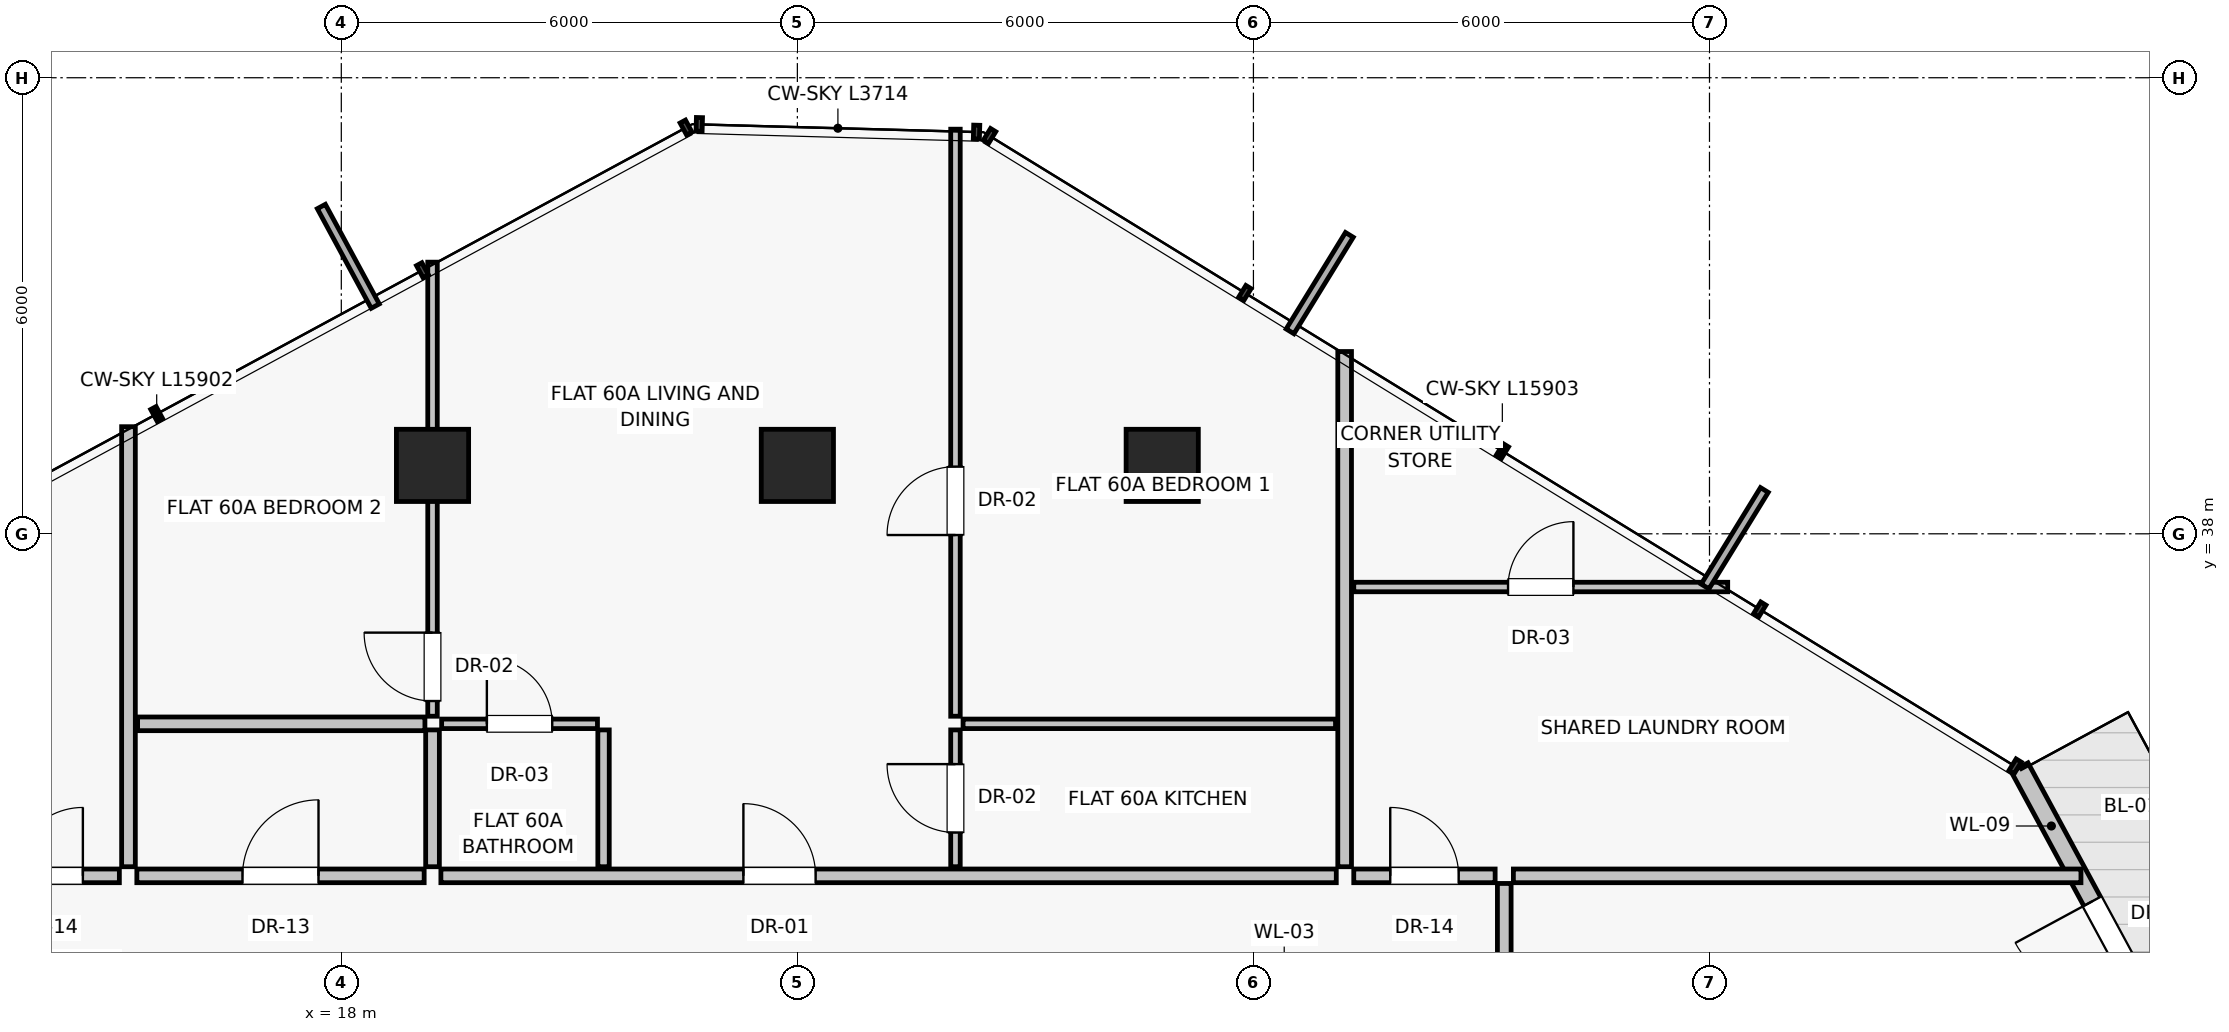
"""IFC4 building model, lengths in metres.
Left out: names, types, materials, properties, quantities, classifications, styles, units other than length and angle.
Written with IfcOpenShell. Run it as: python <this file> out.ifc"""

import sys

from ifc_helpers import new_model, si_unit, direction, frame, frame_2d, origin, origin_2d, place, context, subcontext, project, spatial, rectangle, extrude, source, transform, mapped, element, fill, save


model = new_model("IFC4")
c1 = context("Model", 3, precision=1e-05, world=origin(), true_north=direction((0.0, 1.0)))
c2 = subcontext(c1, "Body", "Model", "MODEL_VIEW")
j1 = project(units=[si_unit("LENGTHUNIT", "METRE"), si_unit("PLANEANGLEUNIT", "RADIAN")], contexts=[c1])
p1 = place(None, origin())
s1 = spatial("IfcSite", under=j1, at=p1, CompositionType="ELEMENT")
p2 = place(p1, origin())
s2 = spatial("IfcBuilding", under=s1, at=p2, CompositionType="ELEMENT")
p3 = place(p2, frame((0.0, 0.0, 211.35)))
s3 = spatial("IfcBuildingStorey", under=s2, at=p3, CompositionType="ELEMENT", Elevation=211.35)
for number, where, z_axis, x_axis in (
    (1, (28.8, 38.9, 0.0), (0.0, 0.0, 1.0), (1.0, 0.0, 0.0)),
    (2, (24.0, 38.9, 0.0), (0.0, 0.0, 1.0), (1.0, 0.0, 0.0)),
    (3, (19.2, 38.9, 0.0), (0.0, 0.0, 1.0), (1.0, 0.0, 0.0)),
):
    element("IfcColumn", number, at=place(p3, frame(where, z_axis=z_axis, x_axis=x_axis)), inside=s3, PredefinedType="COLUMN", context=c2, shape_type="SweptSolid", body=[
        extrude(rectangle(XDim=0.95, YDim=0.95, at=origin_2d()), origin(), (0.0, 0.0, 1.0), 4.3),
    ])
p4 = place(p3, frame((41.943, 31.485, 0.0), z_axis=(0.0, 0.0, 1.0), x_axis=(-0.475895309936, 0.879501935178, 0.0)))
e4 = element("IfcWall", 4, at=p4, inside=s3, PredefinedType="SOLIDWALL", context=c2, shape_type="SweptSolid", body=[
    extrude(rectangle(XDim=3.914, YDim=0.25, at=frame_2d((1.957, 0.0))), origin(), (0.0, 0.0, 1.0), 4.065),
])
p5 = place(p4, frame((0.76, 0.0, 0.0)))
e5 = element("IfcOpeningElement", 5, at=p5, cuts=e4, PredefinedType="OPENING", context=c2, shape_type="SweptSolid", body=[
    extrude(rectangle(XDim=1.15, YDim=2.25, at=frame_2d((0.575, 1.125))), frame((0.0, 0.135, 0.0), z_axis=(0.0, -1.0, 0.0), x_axis=(1.0, 0.0, 0.0)), (0.0, 0.0, 1.0), 0.27),
])
p6 = place(p3, frame((15.2, 33.62, 0.0), z_axis=(0.0, 0.0, 1.0), x_axis=(0.0, 1.0, 0.0)))
e6 = element("IfcWall", 6, at=p6, inside=s3, PredefinedType="PARTITIONING", context=c2, shape_type="SweptSolid", body=[
    extrude(rectangle(XDim=5.789, YDim=0.18, at=frame_2d((2.895, 0.0))), origin(), (0.0, 0.0, 1.0), 4.065),
])
p7 = place(p3, frame((31.2, 33.62, 0.0), z_axis=(0.0, 0.0, 1.0), x_axis=(0.0, 1.0, 0.0)))
e7 = element("IfcWall", 7, at=p7, inside=s3, PredefinedType="PARTITIONING", context=c2, shape_type="SweptSolid", body=[
    extrude(rectangle(XDim=6.778, YDim=0.18, at=frame_2d((3.389, 0.0))), origin(), (0.0, 0.0, 1.0), 4.065),
])
p8 = place(p3, frame((15.31, 33.5, 0.0), z_axis=(0.0, 0.0, 1.0), x_axis=(1.0, 0.0, 0.0)))
e8 = element("IfcWall", 8, at=p8, inside=s3, PredefinedType="PARTITIONING", context=c2, shape_type="SweptSolid", body=[
    extrude(rectangle(XDim=3.78, YDim=0.18, at=frame_2d((1.89, 0.0))), origin(), (0.0, 0.0, 1.0), 4.065),
])
p9 = place(p8, frame((1.39, 0.0, 0.0)))
e9 = element("IfcOpeningElement", 9, at=p9, cuts=e8, PredefinedType="OPENING", context=c2, shape_type="SweptSolid", body=[
    extrude(rectangle(XDim=1.0, YDim=2.01, at=frame_2d((0.5, 1.005))), frame((0.0, 0.1, 0.0), z_axis=(0.0, -1.0, 0.0), x_axis=(1.0, 0.0, 0.0)), (0.0, 0.0, 1.0), 0.2),
])
p10 = place(p3, frame((19.31, 33.5, 0.0), z_axis=(0.0, 0.0, 1.0), x_axis=(1.0, 0.0, 0.0)))
e10 = element("IfcWall", 10, at=p10, inside=s3, PredefinedType="PARTITIONING", context=c2, shape_type="SweptSolid", body=[
    extrude(rectangle(XDim=11.78, YDim=0.18, at=frame_2d((5.89, 0.0))), origin(), (0.0, 0.0, 1.0), 4.065),
])
p11 = place(p10, frame((3.98, 0.0, 0.0)))
e11 = element("IfcOpeningElement", 11, at=p11, cuts=e10, PredefinedType="OPENING", context=c2, shape_type="SweptSolid", body=[
    extrude(rectangle(XDim=0.95, YDim=2.02, at=frame_2d((0.475, 1.01))), frame((0.0, 0.1, 0.0), z_axis=(0.0, -1.0, 0.0), x_axis=(1.0, 0.0, 0.0)), (0.0, 0.0, 1.0), 0.2),
])
p12 = place(p3, frame((15.32, 35.5, 0.0), z_axis=(0.0, 0.0, 1.0), x_axis=(1.0, 0.0, 0.0)))
e12 = element("IfcWall", 12, at=p12, inside=s3, PredefinedType="PARTITIONING", context=c2, shape_type="SweptSolid", body=[
    extrude(rectangle(XDim=3.78, YDim=0.18, at=frame_2d((1.89, 0.0))), origin(), (0.0, 0.0, 1.0), 4.065),
])
p13 = place(p3, frame((19.2, 33.62, 0.0), z_axis=(0.0, 0.0, 1.0), x_axis=(0.0, 1.0, 0.0)))
e13 = element("IfcWall", 13, at=p13, inside=s3, PredefinedType="PARTITIONING", context=c2, shape_type="SweptSolid", body=[
    extrude(rectangle(XDim=1.8, YDim=0.18, at=frame_2d((0.9, 0.0))), origin(), (0.0, 0.0, 1.0), 4.065),
])
p14 = place(p3, frame((19.2, 35.6, 0.0), z_axis=(0.0, 0.0, 1.0), x_axis=(0.0, 1.0, 0.0)))
e14 = element("IfcWall", 14, at=p14, inside=s3, PredefinedType="PARTITIONING", context=c2, shape_type="SweptSolid", body=[
    extrude(rectangle(XDim=5.974, YDim=0.125, at=frame_2d((2.987, 0.0))), origin(), (0.0, 0.0, 1.0), 3.286),
])
p15 = place(p14, frame((0.2, 0.0, 0.0)))
e15 = element("IfcOpeningElement", 15, at=p15, cuts=e14, PredefinedType="OPENING", context=c2, shape_type="SweptSolid", body=[
    extrude(rectangle(XDim=0.9, YDim=2.01, at=frame_2d((0.45, 1.005))), frame((0.0, 0.073, 0.0), z_axis=(0.0, -1.0, 0.0), x_axis=(1.0, 0.0, 0.0)), (0.0, 0.0, 1.0), 0.145),
])
p16 = place(p3, frame((21.45, 33.62, 0.0), z_axis=(0.0, 0.0, 1.0), x_axis=(0.0, 1.0, 0.0)))
e16 = element("IfcWall", 16, at=p16, inside=s3, PredefinedType="PARTITIONING", context=c2, shape_type="SweptSolid", body=[
    extrude(rectangle(XDim=1.8, YDim=0.15, at=frame_2d((0.9, 0.0))), origin(), (0.0, 0.0, 1.0), 4.065),
])
p17 = place(p3, frame((19.32, 35.5, 0.0), z_axis=(0.0, 0.0, 1.0), x_axis=(1.0, 0.0, 0.0)))
e17 = element("IfcWall", 17, at=p17, inside=s3, PredefinedType="PARTITIONING", context=c2, shape_type="SweptSolid", body=[
    extrude(rectangle(XDim=2.05, YDim=0.125, at=frame_2d((1.025, 0.0))), origin(), (0.0, 0.0, 1.0), 3.712),
])
p18 = place(p17, frame((0.595, 0.0, 0.0)))
e18 = element("IfcOpeningElement", 18, at=p18, cuts=e17, PredefinedType="OPENING", context=c2, shape_type="SweptSolid", body=[
    extrude(rectangle(XDim=0.86, YDim=2.01, at=frame_2d((0.43, 1.005))), frame((0.0, 0.073, 0.0), z_axis=(0.0, -1.0, 0.0), x_axis=(1.0, 0.0, 0.0)), (0.0, 0.0, 1.0), 0.145),
])
p19 = place(p3, frame((26.08, 33.62, 0.0), z_axis=(0.0, 0.0, 1.0), x_axis=(0.0, 1.0, 0.0)))
e19 = element("IfcWall", 19, at=p19, inside=s3, PredefinedType="PARTITIONING", context=c2, shape_type="SweptSolid", body=[
    extrude(rectangle(XDim=1.8, YDim=0.125, at=frame_2d((0.9, 0.0))), origin(), (0.0, 0.0, 1.0), 4.065),
])
p20 = place(p19, frame((0.45, 0.0, 0.0)))
e20 = element("IfcOpeningElement", 20, at=p20, cuts=e19, PredefinedType="OPENING", context=c2, shape_type="SweptSolid", body=[
    extrude(rectangle(XDim=0.9, YDim=2.01, at=frame_2d((0.45, 1.005))), frame((0.0, 0.073, 0.0), z_axis=(0.0, -1.0, 0.0), x_axis=(1.0, 0.0, 0.0)), (0.0, 0.0, 1.0), 0.145),
])
p21 = place(p3, frame((26.18, 35.5, 0.0), z_axis=(0.0, 0.0, 1.0), x_axis=(1.0, 0.0, 0.0)))
e21 = element("IfcWall", 21, at=p21, inside=s3, PredefinedType="PARTITIONING", context=c2, shape_type="SweptSolid", body=[
    extrude(rectangle(XDim=4.9, YDim=0.125, at=frame_2d((2.45, 0.0))), origin(), (0.0, 0.0, 1.0), 3.712),
])
p22 = place(p3, frame((26.08, 35.6, 0.0), z_axis=(0.0, 0.0, 1.0), x_axis=(0.0, 1.0, 0.0)))
e22 = element("IfcWall", 22, at=p22, inside=s3, PredefinedType="PARTITIONING", context=c2, shape_type="SweptSolid", body=[
    extrude(rectangle(XDim=7.723, YDim=0.125, at=frame_2d((3.861, 0.0))), origin(), (0.0, 0.0, 1.0), 4.065),
])
p23 = place(p22, frame((2.384, 0.0, 0.0)))
e23 = element("IfcOpeningElement", 23, at=p23, cuts=e22, PredefinedType="OPENING", context=c2, shape_type="SweptSolid", body=[
    extrude(rectangle(XDim=0.9, YDim=2.01, at=frame_2d((0.45, 1.005))), frame((0.0, 0.073, 0.0), z_axis=(0.0, -1.0, 0.0), x_axis=(1.0, 0.0, 0.0)), (0.0, 0.0, 1.0), 0.145),
])
p24 = place(p3, frame((33.3, 31.5, 0.0), z_axis=(0.0, 0.0, 1.0), x_axis=(0.0, 1.0, 0.0)))
e24 = element("IfcWall", 24, at=p24, inside=s3, PredefinedType="PARTITIONING", context=c2, shape_type="SweptSolid", body=[
    extrude(rectangle(XDim=1.9, YDim=0.18, at=frame_2d((0.95, 0.0))), origin(), (0.0, 0.0, 1.0), 4.065),
])
p25 = place(p3, frame((13.22, 33.5, 0.0), z_axis=(0.0, 0.0, 1.0), x_axis=(1.0, 0.0, 0.0)))
e25 = element("IfcWall", 25, at=p25, inside=s3, PredefinedType="PARTITIONING", context=c2, shape_type="SweptSolid", body=[
    extrude(rectangle(XDim=1.86, YDim=0.18, at=frame_2d((0.93, 0.0))), origin(), (0.0, 0.0, 1.0), 4.065),
])
p26 = place(p25, frame((0.48, 0.0, 0.0)))
e26 = element("IfcOpeningElement", 26, at=p26, cuts=e25, PredefinedType="OPENING", context=c2, shape_type="SweptSolid", body=[
    extrude(rectangle(XDim=0.9, YDim=2.01, at=frame_2d((0.45, 1.005))), frame((0.0, 0.1, 0.0), z_axis=(0.0, -1.0, 0.0), x_axis=(1.0, 0.0, 0.0)), (0.0, 0.0, 1.0), 0.2),
])
p27 = place(p3, frame((33.42, 33.5, 0.0), z_axis=(0.0, 0.0, 1.0), x_axis=(1.0, 0.0, 0.0)))
e27 = element("IfcWall", 27, at=p27, inside=s3, PredefinedType="PARTITIONING", context=c2, shape_type="SweptSolid", body=[
    extrude(rectangle(XDim=7.467, YDim=0.18, at=frame_2d((3.733, 0.0))), origin(), (0.0, 0.0, 1.0), 4.065),
])
p28 = place(p3, frame((31.32, 33.5, 0.0), z_axis=(0.0, 0.0, 1.0), x_axis=(1.0, 0.0, 0.0)))
e28 = element("IfcWall", 28, at=p28, inside=s3, PredefinedType="PARTITIONING", context=c2, shape_type="SweptSolid", body=[
    extrude(rectangle(XDim=1.86, YDim=0.18, at=frame_2d((0.93, 0.0))), origin(), (0.0, 0.0, 1.0), 4.065),
])
p29 = place(p28, frame((0.48, 0.0, 0.0)))
e29 = element("IfcOpeningElement", 29, at=p29, cuts=e28, PredefinedType="OPENING", context=c2, shape_type="SweptSolid", body=[
    extrude(rectangle(XDim=0.9, YDim=2.01, at=frame_2d((0.45, 1.005))), frame((0.0, 0.1, 0.0), z_axis=(0.0, -1.0, 0.0), x_axis=(1.0, 0.0, 0.0)), (0.0, 0.0, 1.0), 0.2),
])
p30 = place(p3, frame((31.32, 37.3, 0.0), z_axis=(0.0, 0.0, 1.0), x_axis=(1.0, 0.0, 0.0)))
e30 = element("IfcWall", 30, at=p30, inside=s3, PredefinedType="PARTITIONING", context=c2, shape_type="SweptSolid", body=[
    extrude(rectangle(XDim=4.92, YDim=0.125, at=frame_2d((2.46, 0.0))), origin(), (0.0, 0.0, 1.0), 4.065),
])
p31 = place(p30, frame((2.03, 0.0, 0.0)))
e31 = element("IfcOpeningElement", 31, at=p31, cuts=e30, PredefinedType="OPENING", context=c2, shape_type="SweptSolid", body=[
    extrude(rectangle(XDim=0.86, YDim=2.01, at=frame_2d((0.43, 1.005))), frame((0.0, 0.073, 0.0), z_axis=(0.0, -1.0, 0.0), x_axis=(1.0, 0.0, 0.0)), (0.0, 0.0, 1.0), 0.145),
])
m1 = source(origin(), c2, "Body", "SweptSolid", [
    extrude(rectangle(XDim=1.15, YDim=2.25, at=frame_2d((0.575, 1.125))), frame((0.0, 0.025, 0.0), z_axis=(0.0, -1.0, 0.0), x_axis=(1.0, 0.0, 0.0)), (0.0, 0.0, 1.0), 0.05),
])
p32 = place(p5, frame((1.15, 0.0, 0.0), z_axis=(0.0, 0.0, 1.0), x_axis=(-1.0, 0.0, 0.0)))
e32 = element("IfcDoor", 32, at=p32, inside=s3, OperationType="SINGLE_SWING_RIGHT", PredefinedType="DOOR", context=c2, shape_type="MappedRepresentation", body=[
    mapped(m1, transform((0.0, 0.0, 0.0), scale=1.0)),
])
fill(e5, e32)
m2 = source(origin(), c2, "Body", "SweptSolid", [
    extrude(rectangle(XDim=1.0, YDim=2.01, at=frame_2d((0.5, 1.005))), frame((0.0, 0.025, 0.0), z_axis=(0.0, -1.0, 0.0), x_axis=(1.0, 0.0, 0.0)), (0.0, 0.0, 1.0), 0.05),
])
p33 = place(p9, origin())
e33 = element("IfcDoor", 33, at=p33, inside=s3, OperationType="SINGLE_SWING_RIGHT", PredefinedType="DOOR", context=c2, shape_type="MappedRepresentation", body=[
    mapped(m2, transform((0.0, 0.0, 0.0), scale=1.0)),
])
fill(e9, e33)
m3 = source(origin(), c2, "Body", "SweptSolid", [
    extrude(rectangle(XDim=0.95, YDim=2.02, at=frame_2d((0.475, 1.01))), frame((0.0, 0.025, 0.0), z_axis=(0.0, -1.0, 0.0), x_axis=(1.0, 0.0, 0.0)), (0.0, 0.0, 1.0), 0.05),
])
p34 = place(p11, origin())
e34 = element("IfcDoor", 34, at=p34, inside=s3, OperationType="SINGLE_SWING_LEFT", PredefinedType="DOOR", context=c2, shape_type="MappedRepresentation", body=[
    mapped(m3, transform((0.0, 0.0, 0.0), scale=1.0)),
])
fill(e11, e34)
m4 = source(origin(), c2, "Body", "SweptSolid", [
    extrude(rectangle(XDim=0.9, YDim=2.01, at=frame_2d((0.45, 1.005))), frame((0.0, 0.025, 0.0), z_axis=(0.0, -1.0, 0.0), x_axis=(1.0, 0.0, 0.0)), (0.0, 0.0, 1.0), 0.05),
])
p35 = place(p15, origin())
e35 = element("IfcDoor", 35, at=p35, inside=s3, OperationType="SINGLE_SWING_RIGHT", PredefinedType="DOOR", context=c2, shape_type="MappedRepresentation", body=[
    mapped(m4, transform((0.0, 0.0, 0.0), scale=1.0)),
])
fill(e15, e35)
m5 = source(origin(), c2, "Body", "SweptSolid", [
    extrude(rectangle(XDim=0.86, YDim=2.01, at=frame_2d((0.43, 1.005))), frame((0.0, 0.025, 0.0), z_axis=(0.0, -1.0, 0.0), x_axis=(1.0, 0.0, 0.0)), (0.0, 0.0, 1.0), 0.05),
])
p36 = place(p18, origin())
e36 = element("IfcDoor", 36, at=p36, inside=s3, OperationType="SINGLE_SWING_LEFT", PredefinedType="DOOR", context=c2, shape_type="MappedRepresentation", body=[
    mapped(m5, transform((0.0, 0.0, 0.0), scale=1.0)),
])
fill(e18, e36)
p37 = place(p20, origin())
e37 = element("IfcDoor", 37, at=p37, inside=s3, OperationType="SINGLE_SWING_RIGHT", PredefinedType="DOOR", context=c2, shape_type="MappedRepresentation", body=[
    mapped(m4, transform((0.0, 0.0, 0.0), scale=1.0)),
])
fill(e20, e37)
p38 = place(p23, origin())
e38 = element("IfcDoor", 38, at=p38, inside=s3, OperationType="SINGLE_SWING_LEFT", PredefinedType="DOOR", context=c2, shape_type="MappedRepresentation", body=[
    mapped(m4, transform((0.0, 0.0, 0.0), scale=1.0)),
])
fill(e23, e38)
p39 = place(p26, origin())
e39 = element("IfcDoor", 39, at=p39, inside=s3, OperationType="SINGLE_SWING_RIGHT", PredefinedType="DOOR", context=c2, shape_type="MappedRepresentation", body=[
    mapped(m4, transform((0.0, 0.0, 0.0), scale=1.0)),
])
fill(e26, e39)
p40 = place(p29, origin())
e40 = element("IfcDoor", 40, at=p40, inside=s3, OperationType="SINGLE_SWING_LEFT", PredefinedType="DOOR", context=c2, shape_type="MappedRepresentation", body=[
    mapped(m4, transform((0.0, 0.0, 0.0), scale=1.0)),
])
fill(e29, e40)
p41 = place(p31, origin())
e41 = element("IfcDoor", 41, at=p41, inside=s3, OperationType="SINGLE_SWING_RIGHT", PredefinedType="DOOR", context=c2, shape_type="MappedRepresentation", body=[
    mapped(m5, transform((0.0, 0.0, 0.0), scale=1.0)),
])
fill(e31, e41)
save(model, sys.argv[1])
